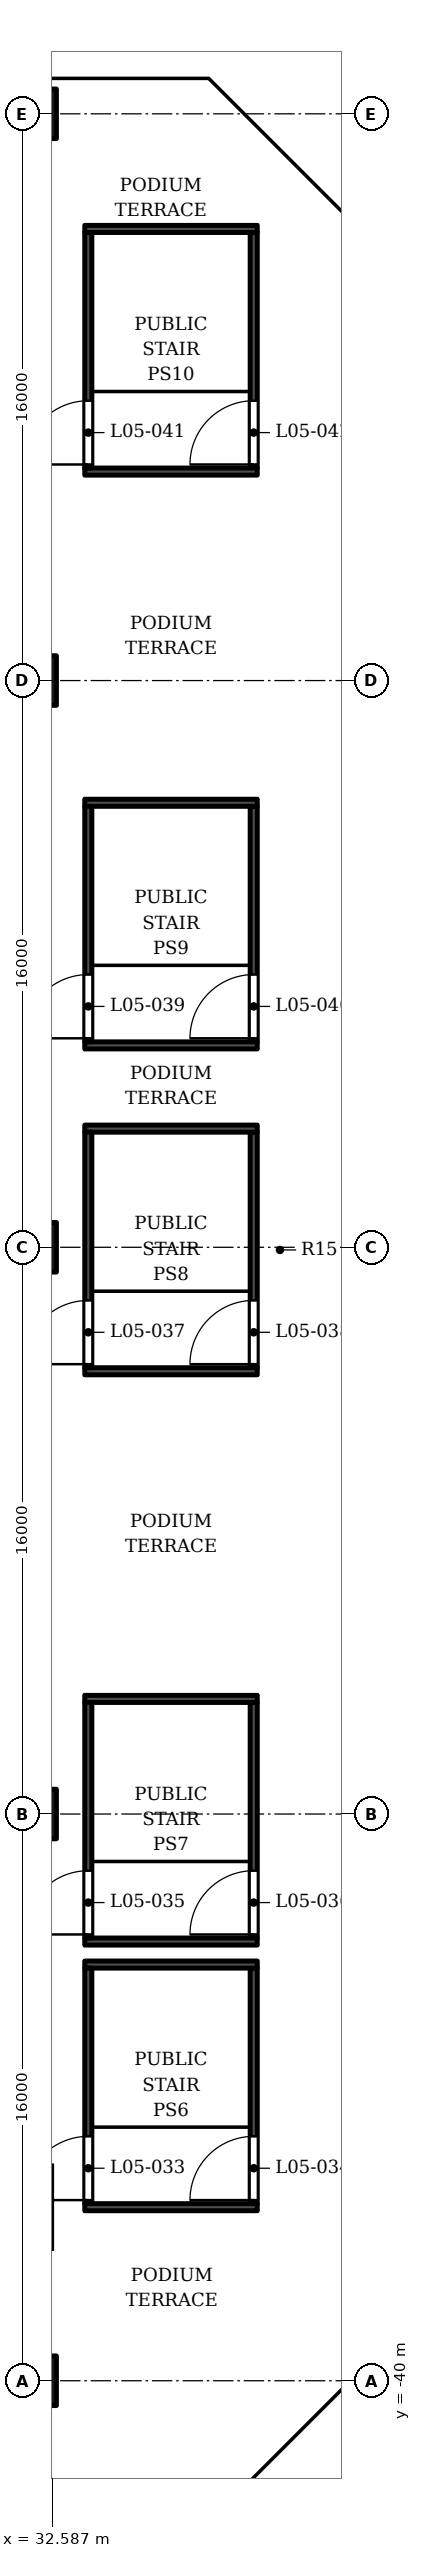
"""IFC4 building model, lengths in metres.
Left out: names, types, materials, properties, quantities, classifications, styles, units other than length and angle.
Written with IfcOpenShell. Run it as: python <this file> out.ifc"""

import sys

from ifc_helpers import new_model, si_unit, direction, frame, frame_2d, origin, origin_2d, place, context, subcontext, project, spatial, rectangle, extrude, element, fill, save


model = new_model("IFC4")
c1 = context("Model", 3, precision=1e-05, world=origin(), true_north=direction((0.0, 1.0)))
c2 = subcontext(c1, "Body", "Model", "MODEL_VIEW")
j1 = project(units=[si_unit("LENGTHUNIT", "METRE"), si_unit("PLANEANGLEUNIT", "RADIAN")], contexts=[c1])
p1 = place(None, origin())
s1 = spatial("IfcSite", under=j1, at=p1, CompositionType="ELEMENT")
p2 = place(p1, origin())
s2 = spatial("IfcBuilding", under=s1, at=p2, CompositionType="ELEMENT")
p3 = place(p2, frame((0.0, 0.0, 40.0)))
s3 = spatial("IfcBuildingStorey", under=s2, at=p3, CompositionType="ELEMENT", Elevation=40.0)
for number, where, z_axis, x_axis in (
    (1, (32.0, -40.0, 0.0), (0.0, 0.0, 1.0), (1.0, 0.0, 0.0)),
    (2, (32.0, -24.0, 0.0), (0.0, 0.0, 1.0), (1.0, 0.0, 0.0)),
    (3, (32.0, -8.0, 0.0), (0.0, 0.0, 1.0), (1.0, 0.0, 0.0)),
    (4, (32.0, 8.0, 0.0), (0.0, 0.0, 1.0), (1.0, 0.0, 0.0)),
    (5, (32.0, 24.0, 0.0), (0.0, 0.0, 1.0), (1.0, 0.0, 0.0)),
):
    element("IfcColumn", number, at=place(p3, frame(where, z_axis=z_axis, x_axis=x_axis)), inside=s3, PredefinedType="COLUMN", context=c2, shape_type="SweptSolid", body=[
        extrude(rectangle(XDim=1.4, YDim=1.4, at=origin_2d()), origin(), (0.0, 0.0, 1.0), 6.0),
    ])
for number, where, z_axis, x_axis in (
    (6, (33.5, -35.1, 0.0), (0.0, 0.0, 1.0), (1.0, 0.0, 0.0)),
    (7, (33.5, -28.25, 0.0), (0.0, 0.0, 1.0), (1.0, 0.0, 0.0)),
):
    element("IfcWall", number, at=place(p3, frame(where, z_axis=z_axis, x_axis=x_axis)), inside=s3, PredefinedType="SOLIDWALL", context=c2, shape_type="SweptSolid", body=[
        extrude(rectangle(XDim=4.87, YDim=0.2, at=frame_2d((2.435, 0.0))), origin(), (0.0, 0.0, 1.0), 3.0),
    ])
p4 = place(p3, frame((33.6, -35.0, 0.0), z_axis=(0.0, 0.0, 1.0), x_axis=(0.0, 1.0, 0.0)))
e8 = element("IfcWall", 8, at=p4, inside=s3, PredefinedType="SOLIDWALL", context=c2, shape_type="SweptSolid", body=[
    extrude(rectangle(XDim=6.65, YDim=0.2, at=frame_2d((3.325, 0.0))), origin(), (0.0, 0.0, 1.0), 3.0),
])
p5 = place(p4, frame((0.1, 0.0, 0.0)))
e9 = element("IfcOpeningElement", 9, at=p5, cuts=e8, PredefinedType="OPENING", context=c2, shape_type="SweptSolid", body=[
    extrude(rectangle(XDim=1.8, YDim=2.4, at=frame_2d((0.9, 1.2))), frame((0.0, 0.11, 0.0), z_axis=(0.0, -1.0, 0.0), x_axis=(1.0, 0.0, 0.0)), (0.0, 0.0, 1.0), 0.22),
])
p6 = place(p3, frame((38.27, -35.0, 0.0), z_axis=(0.0, 0.0, 1.0), x_axis=(0.0, 1.0, 0.0)))
e10 = element("IfcWall", 10, at=p6, inside=s3, PredefinedType="SOLIDWALL", context=c2, shape_type="SweptSolid", body=[
    extrude(rectangle(XDim=6.65, YDim=0.2, at=frame_2d((3.325, 0.0))), origin(), (0.0, 0.0, 1.0), 3.0),
])
p7 = place(p6, frame((0.1, 0.0, 0.0)))
e11 = element("IfcOpeningElement", 11, at=p7, cuts=e10, PredefinedType="OPENING", context=c2, shape_type="SweptSolid", body=[
    extrude(rectangle(XDim=1.8, YDim=2.4, at=frame_2d((0.9, 1.2))), frame((0.0, 0.11, 0.0), z_axis=(0.0, -1.0, 0.0), x_axis=(1.0, 0.0, 0.0)), (0.0, 0.0, 1.0), 0.22),
])
for number, where, z_axis, x_axis in (
    (12, (33.5, -27.6, 0.0), (0.0, 0.0, 1.0), (1.0, 0.0, 0.0)),
    (13, (33.5, -20.75, 0.0), (0.0, 0.0, 1.0), (1.0, 0.0, 0.0)),
):
    element("IfcWall", number, at=place(p3, frame(where, z_axis=z_axis, x_axis=x_axis)), inside=s3, PredefinedType="SOLIDWALL", context=c2, shape_type="SweptSolid", body=[
        extrude(rectangle(XDim=4.87, YDim=0.2, at=frame_2d((2.435, 0.0))), origin(), (0.0, 0.0, 1.0), 3.0),
    ])
p8 = place(p3, frame((33.6, -27.5, 0.0), z_axis=(0.0, 0.0, 1.0), x_axis=(0.0, 1.0, 0.0)))
e14 = element("IfcWall", 14, at=p8, inside=s3, PredefinedType="SOLIDWALL", context=c2, shape_type="SweptSolid", body=[
    extrude(rectangle(XDim=6.65, YDim=0.2, at=frame_2d((3.325, 0.0))), origin(), (0.0, 0.0, 1.0), 3.0),
])
p9 = place(p8, frame((0.1, 0.0, 0.0)))
e15 = element("IfcOpeningElement", 15, at=p9, cuts=e14, PredefinedType="OPENING", context=c2, shape_type="SweptSolid", body=[
    extrude(rectangle(XDim=1.8, YDim=2.4, at=frame_2d((0.9, 1.2))), frame((0.0, 0.11, 0.0), z_axis=(0.0, -1.0, 0.0), x_axis=(1.0, 0.0, 0.0)), (0.0, 0.0, 1.0), 0.22),
])
p10 = place(p3, frame((38.27, -27.5, 0.0), z_axis=(0.0, 0.0, 1.0), x_axis=(0.0, 1.0, 0.0)))
e16 = element("IfcWall", 16, at=p10, inside=s3, PredefinedType="SOLIDWALL", context=c2, shape_type="SweptSolid", body=[
    extrude(rectangle(XDim=6.65, YDim=0.2, at=frame_2d((3.325, 0.0))), origin(), (0.0, 0.0, 1.0), 3.0),
])
p11 = place(p10, frame((0.1, 0.0, 0.0)))
e17 = element("IfcOpeningElement", 17, at=p11, cuts=e16, PredefinedType="OPENING", context=c2, shape_type="SweptSolid", body=[
    extrude(rectangle(XDim=1.8, YDim=2.4, at=frame_2d((0.9, 1.2))), frame((0.0, 0.11, 0.0), z_axis=(0.0, -1.0, 0.0), x_axis=(1.0, 0.0, 0.0)), (0.0, 0.0, 1.0), 0.22),
])
for number, where, z_axis, x_axis in (
    (18, (33.5, -11.5, 0.0), (0.0, 0.0, 1.0), (1.0, 0.0, 0.0)),
    (19, (33.5, -4.65, 0.0), (0.0, 0.0, 1.0), (1.0, 0.0, 0.0)),
):
    element("IfcWall", number, at=place(p3, frame(where, z_axis=z_axis, x_axis=x_axis)), inside=s3, PredefinedType="SOLIDWALL", context=c2, shape_type="SweptSolid", body=[
        extrude(rectangle(XDim=4.87, YDim=0.2, at=frame_2d((2.435, 0.0))), origin(), (0.0, 0.0, 1.0), 3.0),
    ])
p12 = place(p3, frame((33.6, -11.4, 0.0), z_axis=(0.0, 0.0, 1.0), x_axis=(0.0, 1.0, 0.0)))
e20 = element("IfcWall", 20, at=p12, inside=s3, PredefinedType="SOLIDWALL", context=c2, shape_type="SweptSolid", body=[
    extrude(rectangle(XDim=6.65, YDim=0.2, at=frame_2d((3.325, 0.0))), origin(), (0.0, 0.0, 1.0), 3.0),
])
p13 = place(p12, frame((0.1, 0.0, 0.0)))
e21 = element("IfcOpeningElement", 21, at=p13, cuts=e20, PredefinedType="OPENING", context=c2, shape_type="SweptSolid", body=[
    extrude(rectangle(XDim=1.8, YDim=2.4, at=frame_2d((0.9, 1.2))), frame((0.0, 0.11, 0.0), z_axis=(0.0, -1.0, 0.0), x_axis=(1.0, 0.0, 0.0)), (0.0, 0.0, 1.0), 0.22),
])
p14 = place(p3, frame((38.27, -11.4, 0.0), z_axis=(0.0, 0.0, 1.0), x_axis=(0.0, 1.0, 0.0)))
e22 = element("IfcWall", 22, at=p14, inside=s3, PredefinedType="SOLIDWALL", context=c2, shape_type="SweptSolid", body=[
    extrude(rectangle(XDim=6.65, YDim=0.2, at=frame_2d((3.325, 0.0))), origin(), (0.0, 0.0, 1.0), 3.0),
])
p15 = place(p14, frame((0.1, 0.0, 0.0)))
e23 = element("IfcOpeningElement", 23, at=p15, cuts=e22, PredefinedType="OPENING", context=c2, shape_type="SweptSolid", body=[
    extrude(rectangle(XDim=1.8, YDim=2.4, at=frame_2d((0.9, 1.2))), frame((0.0, 0.11, 0.0), z_axis=(0.0, -1.0, 0.0), x_axis=(1.0, 0.0, 0.0)), (0.0, 0.0, 1.0), 0.22),
])
for number, where, z_axis, x_axis in (
    (24, (33.5, -2.3, 0.0), (0.0, 0.0, 1.0), (1.0, 0.0, 0.0)),
    (25, (33.5, 4.55, 0.0), (0.0, 0.0, 1.0), (1.0, 0.0, 0.0)),
):
    element("IfcWall", number, at=place(p3, frame(where, z_axis=z_axis, x_axis=x_axis)), inside=s3, PredefinedType="SOLIDWALL", context=c2, shape_type="SweptSolid", body=[
        extrude(rectangle(XDim=4.87, YDim=0.2, at=frame_2d((2.435, 0.0))), origin(), (0.0, 0.0, 1.0), 3.0),
    ])
p16 = place(p3, frame((33.6, -2.2, 0.0), z_axis=(0.0, 0.0, 1.0), x_axis=(0.0, 1.0, 0.0)))
e26 = element("IfcWall", 26, at=p16, inside=s3, PredefinedType="SOLIDWALL", context=c2, shape_type="SweptSolid", body=[
    extrude(rectangle(XDim=6.65, YDim=0.2, at=frame_2d((3.325, 0.0))), origin(), (0.0, 0.0, 1.0), 3.0),
])
p17 = place(p16, frame((0.1, 0.0, 0.0)))
e27 = element("IfcOpeningElement", 27, at=p17, cuts=e26, PredefinedType="OPENING", context=c2, shape_type="SweptSolid", body=[
    extrude(rectangle(XDim=1.8, YDim=2.4, at=frame_2d((0.9, 1.2))), frame((0.0, 0.11, 0.0), z_axis=(0.0, -1.0, 0.0), x_axis=(1.0, 0.0, 0.0)), (0.0, 0.0, 1.0), 0.22),
])
p18 = place(p3, frame((38.27, -2.2, 0.0), z_axis=(0.0, 0.0, 1.0), x_axis=(0.0, 1.0, 0.0)))
e28 = element("IfcWall", 28, at=p18, inside=s3, PredefinedType="SOLIDWALL", context=c2, shape_type="SweptSolid", body=[
    extrude(rectangle(XDim=6.65, YDim=0.2, at=frame_2d((3.325, 0.0))), origin(), (0.0, 0.0, 1.0), 3.0),
])
p19 = place(p18, frame((0.1, 0.0, 0.0)))
e29 = element("IfcOpeningElement", 29, at=p19, cuts=e28, PredefinedType="OPENING", context=c2, shape_type="SweptSolid", body=[
    extrude(rectangle(XDim=1.8, YDim=2.4, at=frame_2d((0.9, 1.2))), frame((0.0, 0.11, 0.0), z_axis=(0.0, -1.0, 0.0), x_axis=(1.0, 0.0, 0.0)), (0.0, 0.0, 1.0), 0.22),
])
for number, where, z_axis, x_axis in (
    (30, (33.5, 13.9, 0.0), (0.0, 0.0, 1.0), (1.0, 0.0, 0.0)),
    (31, (33.5, 20.75, 0.0), (0.0, 0.0, 1.0), (1.0, 0.0, 0.0)),
):
    element("IfcWall", number, at=place(p3, frame(where, z_axis=z_axis, x_axis=x_axis)), inside=s3, PredefinedType="SOLIDWALL", context=c2, shape_type="SweptSolid", body=[
        extrude(rectangle(XDim=4.87, YDim=0.2, at=frame_2d((2.435, 0.0))), origin(), (0.0, 0.0, 1.0), 3.0),
    ])
p20 = place(p3, frame((33.6, 14.0, 0.0), z_axis=(0.0, 0.0, 1.0), x_axis=(0.0, 1.0, 0.0)))
e32 = element("IfcWall", 32, at=p20, inside=s3, PredefinedType="SOLIDWALL", context=c2, shape_type="SweptSolid", body=[
    extrude(rectangle(XDim=6.65, YDim=0.2, at=frame_2d((3.325, 0.0))), origin(), (0.0, 0.0, 1.0), 3.0),
])
p21 = place(p20, frame((0.1, 0.0, 0.0)))
e33 = element("IfcOpeningElement", 33, at=p21, cuts=e32, PredefinedType="OPENING", context=c2, shape_type="SweptSolid", body=[
    extrude(rectangle(XDim=1.8, YDim=2.4, at=frame_2d((0.9, 1.2))), frame((0.0, 0.11, 0.0), z_axis=(0.0, -1.0, 0.0), x_axis=(1.0, 0.0, 0.0)), (0.0, 0.0, 1.0), 0.22),
])
p22 = place(p3, frame((38.27, 14.0, 0.0), z_axis=(0.0, 0.0, 1.0), x_axis=(0.0, 1.0, 0.0)))
e34 = element("IfcWall", 34, at=p22, inside=s3, PredefinedType="SOLIDWALL", context=c2, shape_type="SweptSolid", body=[
    extrude(rectangle(XDim=6.65, YDim=0.2, at=frame_2d((3.325, 0.0))), origin(), (0.0, 0.0, 1.0), 3.0),
])
p23 = place(p22, frame((0.1, 0.0, 0.0)))
e35 = element("IfcOpeningElement", 35, at=p23, cuts=e34, PredefinedType="OPENING", context=c2, shape_type="SweptSolid", body=[
    extrude(rectangle(XDim=1.8, YDim=2.4, at=frame_2d((0.9, 1.2))), frame((0.0, 0.11, 0.0), z_axis=(0.0, -1.0, 0.0), x_axis=(1.0, 0.0, 0.0)), (0.0, 0.0, 1.0), 0.22),
])
p24 = place(p5, origin())
e36 = element("IfcDoor", 36, at=p24, inside=s3, OperationType="DOUBLE_DOOR_SINGLE_SWING", PredefinedType="DOOR", context=c2, shape_type="SweptSolid", body=[
    extrude(rectangle(XDim=1.8, YDim=2.4, at=frame_2d((0.9, 1.2))), frame((0.0, 0.025, 0.0), z_axis=(0.0, -1.0, 0.0), x_axis=(1.0, 0.0, 0.0)), (0.0, 0.0, 1.0), 0.05),
])
fill(e9, e36)
p25 = place(p7, origin())
e37 = element("IfcDoor", 37, at=p25, inside=s3, OperationType="DOUBLE_DOOR_SINGLE_SWING", PredefinedType="DOOR", context=c2, shape_type="SweptSolid", body=[
    extrude(rectangle(XDim=1.8, YDim=2.4, at=frame_2d((0.9, 1.2))), frame((0.0, 0.025, 0.0), z_axis=(0.0, -1.0, 0.0), x_axis=(1.0, 0.0, 0.0)), (0.0, 0.0, 1.0), 0.05),
])
fill(e11, e37)
p26 = place(p9, origin())
e38 = element("IfcDoor", 38, at=p26, inside=s3, OperationType="DOUBLE_DOOR_SINGLE_SWING", PredefinedType="DOOR", context=c2, shape_type="SweptSolid", body=[
    extrude(rectangle(XDim=1.8, YDim=2.4, at=frame_2d((0.9, 1.2))), frame((0.0, 0.025, 0.0), z_axis=(0.0, -1.0, 0.0), x_axis=(1.0, 0.0, 0.0)), (0.0, 0.0, 1.0), 0.05),
])
fill(e15, e38)
p27 = place(p11, origin())
e39 = element("IfcDoor", 39, at=p27, inside=s3, OperationType="DOUBLE_DOOR_SINGLE_SWING", PredefinedType="DOOR", context=c2, shape_type="SweptSolid", body=[
    extrude(rectangle(XDim=1.8, YDim=2.4, at=frame_2d((0.9, 1.2))), frame((0.0, 0.025, 0.0), z_axis=(0.0, -1.0, 0.0), x_axis=(1.0, 0.0, 0.0)), (0.0, 0.0, 1.0), 0.05),
])
fill(e17, e39)
p28 = place(p13, origin())
e40 = element("IfcDoor", 40, at=p28, inside=s3, OperationType="DOUBLE_DOOR_SINGLE_SWING", PredefinedType="DOOR", context=c2, shape_type="SweptSolid", body=[
    extrude(rectangle(XDim=1.8, YDim=2.4, at=frame_2d((0.9, 1.2))), frame((0.0, 0.025, 0.0), z_axis=(0.0, -1.0, 0.0), x_axis=(1.0, 0.0, 0.0)), (0.0, 0.0, 1.0), 0.05),
])
fill(e21, e40)
p29 = place(p15, origin())
e41 = element("IfcDoor", 41, at=p29, inside=s3, OperationType="DOUBLE_DOOR_SINGLE_SWING", PredefinedType="DOOR", context=c2, shape_type="SweptSolid", body=[
    extrude(rectangle(XDim=1.8, YDim=2.4, at=frame_2d((0.9, 1.2))), frame((0.0, 0.025, 0.0), z_axis=(0.0, -1.0, 0.0), x_axis=(1.0, 0.0, 0.0)), (0.0, 0.0, 1.0), 0.05),
])
fill(e23, e41)
p30 = place(p17, origin())
e42 = element("IfcDoor", 42, at=p30, inside=s3, OperationType="DOUBLE_DOOR_SINGLE_SWING", PredefinedType="DOOR", context=c2, shape_type="SweptSolid", body=[
    extrude(rectangle(XDim=1.8, YDim=2.4, at=frame_2d((0.9, 1.2))), frame((0.0, 0.025, 0.0), z_axis=(0.0, -1.0, 0.0), x_axis=(1.0, 0.0, 0.0)), (0.0, 0.0, 1.0), 0.05),
])
fill(e27, e42)
p31 = place(p19, origin())
e43 = element("IfcDoor", 43, at=p31, inside=s3, OperationType="DOUBLE_DOOR_SINGLE_SWING", PredefinedType="DOOR", context=c2, shape_type="SweptSolid", body=[
    extrude(rectangle(XDim=1.8, YDim=2.4, at=frame_2d((0.9, 1.2))), frame((0.0, 0.025, 0.0), z_axis=(0.0, -1.0, 0.0), x_axis=(1.0, 0.0, 0.0)), (0.0, 0.0, 1.0), 0.05),
])
fill(e29, e43)
p32 = place(p21, origin())
e44 = element("IfcDoor", 44, at=p32, inside=s3, OperationType="DOUBLE_DOOR_SINGLE_SWING", PredefinedType="DOOR", context=c2, shape_type="SweptSolid", body=[
    extrude(rectangle(XDim=1.8, YDim=2.4, at=frame_2d((0.9, 1.2))), frame((0.0, 0.025, 0.0), z_axis=(0.0, -1.0, 0.0), x_axis=(1.0, 0.0, 0.0)), (0.0, 0.0, 1.0), 0.05),
])
fill(e33, e44)
p33 = place(p23, origin())
e45 = element("IfcDoor", 45, at=p33, inside=s3, OperationType="DOUBLE_DOOR_SINGLE_SWING", PredefinedType="DOOR", context=c2, shape_type="SweptSolid", body=[
    extrude(rectangle(XDim=1.8, YDim=2.4, at=frame_2d((0.9, 1.2))), frame((0.0, 0.025, 0.0), z_axis=(0.0, -1.0, 0.0), x_axis=(1.0, 0.0, 0.0)), (0.0, 0.0, 1.0), 0.05),
])
fill(e35, e45)
save(model, sys.argv[1])
